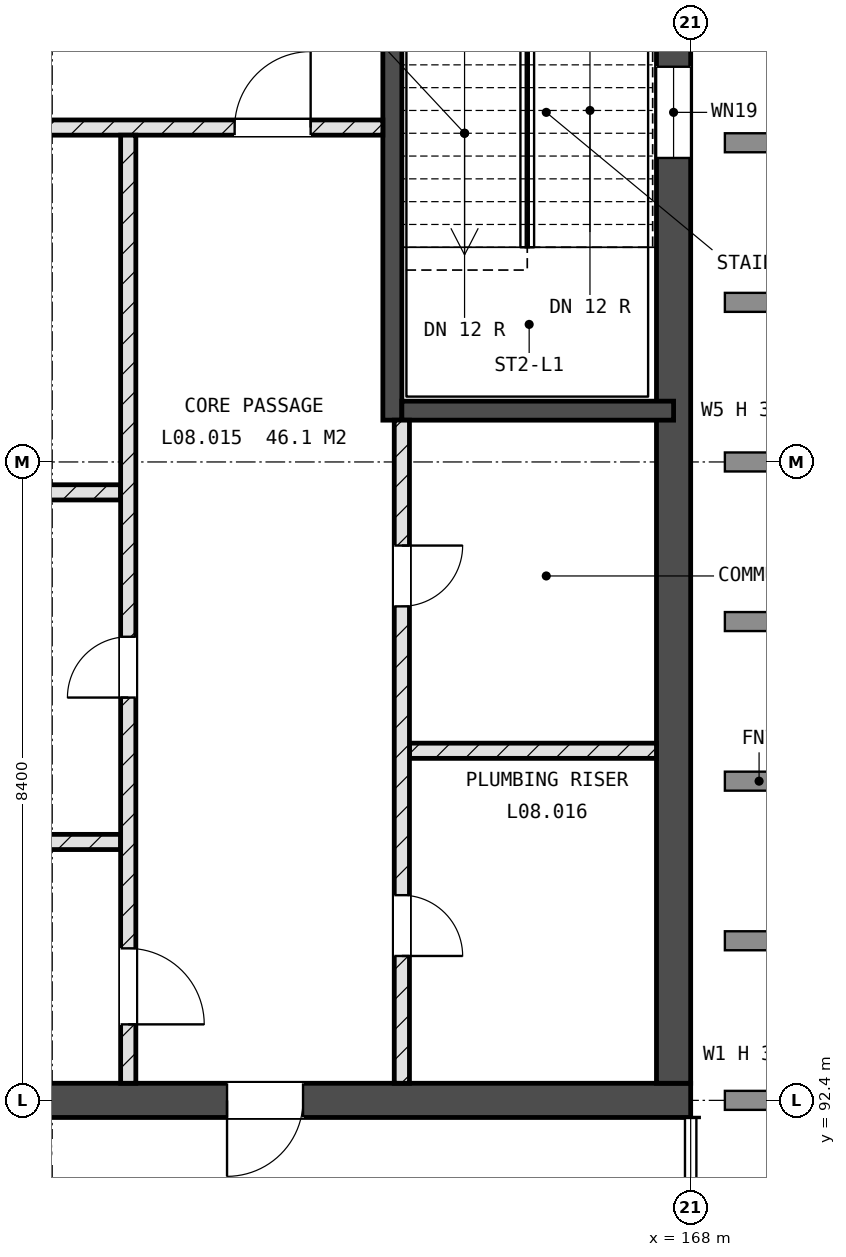
"""IFC4 building model, lengths in metres.
Left out: names, types, materials, properties, quantities, classifications, styles, units other than length and angle.
Written with IfcOpenShell. Run it as: python <this file> out.ifc"""

import sys

from ifc_helpers import new_model, si_unit, direction, frame, frame_2d, origin, place, context, subcontext, project, spatial, rectangle, extrude, element, fill, save


model = new_model("IFC4")
c1 = context("Model", 3, precision=1e-05, world=origin(), true_north=direction((0.0, 1.0)))
c2 = subcontext(c1, "Body", "Model", "MODEL_VIEW")
j1 = project(units=[si_unit("LENGTHUNIT", "METRE"), si_unit("PLANEANGLEUNIT", "RADIAN")], contexts=[c1])
p1 = place(None, origin())
s1 = spatial("IfcSite", under=j1, at=p1, CompositionType="ELEMENT")
p2 = place(p1, origin())
s2 = spatial("IfcBuilding", under=s1, at=p2, CompositionType="ELEMENT")
p3 = place(p2, frame((0.0, 0.0, 32.4)))
s3 = spatial("IfcBuildingStorey", under=s2, at=p3, CompositionType="ELEMENT", Elevation=32.4)
p4 = place(p3, frame((142.8, 92.4, -0.25), z_axis=(0.0, 0.0, 1.0), x_axis=(1.0, 0.0, 0.0)))
e1 = element("IfcWall", 1, at=p4, inside=s3, PredefinedType="SHEAR", context=c2, shape_type="SweptSolid", body=[
    extrude(rectangle(XDim=25.2, YDim=0.45, at=frame_2d((12.6, 0.0))), origin(), (0.0, 0.0, 1.0), 3.6),
])
p5 = place(p4, frame((1.4, 0.0, 0.25)))
e2 = element("IfcOpeningElement", 2, at=p5, cuts=e1, PredefinedType="OPENING", context=c2, shape_type="SweptSolid", body=[
    extrude(rectangle(XDim=1.0, YDim=2.1, at=frame_2d((0.5, 1.05))), frame((0.0, 0.235, 0.0), z_axis=(0.0, -1.0, 0.0), x_axis=(1.0, 0.0, 0.0)), (0.0, 0.0, 1.0), 0.47),
])
p6 = place(p4, frame((19.1, 0.0, 0.25)))
e3 = element("IfcOpeningElement", 3, at=p6, cuts=e1, PredefinedType="OPENING", context=c2, shape_type="SweptSolid", body=[
    extrude(rectangle(XDim=1.0, YDim=2.1, at=frame_2d((0.5, 1.05))), frame((0.0, 0.235, 0.0), z_axis=(0.0, -1.0, 0.0), x_axis=(1.0, 0.0, 0.0)), (0.0, 0.0, 1.0), 0.47),
])
p7 = place(p4, frame((10.4, 0.0, 0.25)))
e4 = element("IfcOpeningElement", 4, at=p7, cuts=e1, PredefinedType="OPENING", context=c2, shape_type="SweptSolid", body=[
    extrude(rectangle(XDim=1.0, YDim=2.1, at=frame_2d((0.5, 1.05))), frame((0.0, 0.235, 0.0), z_axis=(0.0, -1.0, 0.0), x_axis=(1.0, 0.0, 0.0)), (0.0, 0.0, 1.0), 0.47),
])
p8 = place(p3, frame((167.775, 92.625, -0.25), z_axis=(0.0, 0.0, 1.0), x_axis=(0.0, 1.0, 0.0)))
e5 = element("IfcWall", 5, at=p8, inside=s3, PredefinedType="SHEAR", context=c2, shape_type="SweptSolid", body=[
    extrude(rectangle(XDim=16.35, YDim=0.45, at=frame_2d((8.175, 0.0))), origin(), (0.0, 0.0, 1.0), 3.6),
])
p9 = place(p8, frame((12.175, 0.0, 1.85)))
e6 = element("IfcOpeningElement", 6, at=p9, cuts=e5, PredefinedType="OPENING", context=c2, shape_type="SweptSolid", body=[
    extrude(rectangle(XDim=1.2, YDim=0.9, at=frame_2d((0.6, 0.45))), frame((0.0, 0.235, 0.0), z_axis=(0.0, -1.0, 0.0), x_axis=(1.0, 0.0, 0.0)), (0.0, 0.0, 1.0), 0.47),
])
p10 = place(p3, frame((164.075, 101.35, -0.25), z_axis=(0.0, 0.0, 1.0), x_axis=(0.0, 1.0, 0.0)))
e7 = element("IfcWall", 7, at=p10, inside=s3, PredefinedType="SHEAR", context=c2, shape_type="SweptSolid", body=[
    extrude(rectangle(XDim=7.625, YDim=0.25, at=frame_2d((3.812, 0.0))), origin(), (0.0, 0.0, 1.0), 3.6),
])
p11 = place(p10, frame((6.5, 0.0, 0.25)))
e8 = element("IfcOpeningElement", 8, at=p11, cuts=e7, PredefinedType="OPENING", context=c2, shape_type="SweptSolid", body=[
    extrude(rectangle(XDim=1.0, YDim=2.1, at=frame_2d((0.5, 1.05))), frame((0.0, 0.135, 0.0), z_axis=(0.0, -1.0, 0.0), x_axis=(1.0, 0.0, 0.0)), (0.0, 0.0, 1.0), 0.27),
])
p12 = place(p3, frame((164.2, 101.475, -0.25), z_axis=(0.0, 0.0, 1.0), x_axis=(1.0, 0.0, 0.0)))
e9 = element("IfcWall", 9, at=p12, inside=s3, PredefinedType="SHEAR", context=c2, shape_type="SweptSolid", body=[
    extrude(rectangle(XDim=3.575, YDim=0.25, at=frame_2d((1.788, 0.0))), origin(), (0.0, 0.0, 1.0), 3.6),
])
p13 = place(p3, frame((158.25, 95.8, 0.0), z_axis=(0.0, 0.0, 1.0), x_axis=(1.0, 0.0, 0.0)))
e10 = element("IfcWall", 10, at=p13, inside=s3, PredefinedType="SOLIDWALL", context=c2, shape_type="SweptSolid", body=[
    extrude(rectangle(XDim=2.25, YDim=0.2, at=frame_2d((1.125, 0.0))), origin(), (0.0, 0.0, 1.0), 3.3),
])
p14 = place(p3, frame((164.3, 97.0, 0.0), z_axis=(0.0, 0.0, 1.0), x_axis=(1.0, 0.0, 0.0)))
e11 = element("IfcWall", 11, at=p14, inside=s3, PredefinedType="SOLIDWALL", context=c2, shape_type="SweptSolid", body=[
    extrude(rectangle(XDim=3.25, YDim=0.2, at=frame_2d((1.625, 0.0))), origin(), (0.0, 0.0, 1.0), 3.3),
])
p15 = place(p3, frame((146.5, 100.4, 0.0), z_axis=(0.0, 0.0, 1.0), x_axis=(1.0, 0.0, 0.0)))
e12 = element("IfcWall", 12, at=p15, inside=s3, PredefinedType="SOLIDWALL", context=c2, shape_type="SweptSolid", body=[
    extrude(rectangle(XDim=14.0, YDim=0.2, at=frame_2d((7.0, 0.0))), origin(), (0.0, 0.0, 1.0), 3.3),
])
p16 = place(p3, frame((143.25, 105.2, 0.0), z_axis=(0.0, 0.0, 1.0), x_axis=(1.0, 0.0, 0.0)))
e13 = element("IfcWall", 13, at=p16, inside=s3, PredefinedType="SOLIDWALL", context=c2, shape_type="SweptSolid", body=[
    extrude(rectangle(XDim=20.7, YDim=0.2, at=frame_2d((10.35, 0.0))), origin(), (0.0, 0.0, 1.0), 3.3),
])
p17 = place(p16, frame((11.45, 0.0, 0.0)))
e14 = element("IfcOpeningElement", 14, at=p17, cuts=e13, PredefinedType="OPENING", context=c2, shape_type="SweptSolid", body=[
    extrude(rectangle(XDim=0.8, YDim=2.1, at=frame_2d((0.4, 1.05))), frame((0.0, 0.11, 0.0), z_axis=(0.0, -1.0, 0.0), x_axis=(1.0, 0.0, 0.0)), (0.0, 0.0, 1.0), 0.22),
])
p18 = place(p16, frame((18.75, 0.0, 0.0)))
e15 = element("IfcOpeningElement", 15, at=p18, cuts=e13, PredefinedType="OPENING", context=c2, shape_type="SweptSolid", body=[
    extrude(rectangle(XDim=1.0, YDim=2.1, at=frame_2d((0.5, 1.05))), frame((0.0, 0.11, 0.0), z_axis=(0.0, -1.0, 0.0), x_axis=(1.0, 0.0, 0.0)), (0.0, 0.0, 1.0), 0.22),
])
p19 = place(p3, frame((160.6, 92.625, 0.0), z_axis=(0.0, 0.0, 1.0), x_axis=(0.0, 1.0, 0.0)))
e16 = element("IfcWall", 16, at=p19, inside=s3, PredefinedType="SOLIDWALL", context=c2, shape_type="SweptSolid", body=[
    extrude(rectangle(XDim=12.475, YDim=0.2, at=frame_2d((6.238, 0.0))), origin(), (0.0, 0.0, 1.0), 3.3),
])
p20 = place(p19, frame((5.075, 0.0, 0.0)))
e17 = element("IfcOpeningElement", 17, at=p20, cuts=e16, PredefinedType="OPENING", context=c2, shape_type="SweptSolid", body=[
    extrude(rectangle(XDim=0.8, YDim=2.1, at=frame_2d((0.4, 1.05))), frame((0.0, 0.11, 0.0), z_axis=(0.0, -1.0, 0.0), x_axis=(1.0, 0.0, 0.0)), (0.0, 0.0, 1.0), 0.22),
])
p21 = place(p19, frame((0.775, 0.0, 0.0)))
e18 = element("IfcOpeningElement", 18, at=p21, cuts=e16, PredefinedType="OPENING", context=c2, shape_type="SweptSolid", body=[
    extrude(rectangle(XDim=1.0, YDim=2.1, at=frame_2d((0.5, 1.05))), frame((0.0, 0.11, 0.0), z_axis=(0.0, -1.0, 0.0), x_axis=(1.0, 0.0, 0.0)), (0.0, 0.0, 1.0), 0.22),
])
p22 = place(p3, frame((164.2, 92.625, 0.0), z_axis=(0.0, 0.0, 1.0), x_axis=(0.0, 1.0, 0.0)))
e19 = element("IfcWall", 19, at=p22, inside=s3, PredefinedType="SOLIDWALL", context=c2, shape_type="SweptSolid", body=[
    extrude(rectangle(XDim=8.725, YDim=0.2, at=frame_2d((4.363, 0.0))), origin(), (0.0, 0.0, 1.0), 3.3),
])
p23 = place(p22, frame((1.675, 0.0, 0.0)))
e20 = element("IfcOpeningElement", 20, at=p23, cuts=e19, PredefinedType="OPENING", context=c2, shape_type="SweptSolid", body=[
    extrude(rectangle(XDim=0.8, YDim=2.1, at=frame_2d((0.4, 1.05))), frame((0.0, 0.11, 0.0), z_axis=(0.0, -1.0, 0.0), x_axis=(1.0, 0.0, 0.0)), (0.0, 0.0, 1.0), 0.22),
])
p24 = place(p22, frame((6.275, 0.0, 0.0)))
e21 = element("IfcOpeningElement", 21, at=p24, cuts=e19, PredefinedType="OPENING", context=c2, shape_type="SweptSolid", body=[
    extrude(rectangle(XDim=0.8, YDim=2.1, at=frame_2d((0.4, 1.05))), frame((0.0, 0.11, 0.0), z_axis=(0.0, -1.0, 0.0), x_axis=(1.0, 0.0, 0.0)), (0.0, 0.0, 1.0), 0.22),
])
p25 = place(p9, origin())
e22 = element("IfcWindow", 22, at=p25, inside=s3, PartitioningType="SINGLE_PANEL", PredefinedType="WINDOW", context=c2, shape_type="SweptSolid", body=[
    extrude(rectangle(XDim=1.2, YDim=0.9, at=frame_2d((0.6, 0.45))), frame((0.0, 0.03, 0.0), z_axis=(0.0, -1.0, 0.0), x_axis=(1.0, 0.0, 0.0)), (0.0, 0.0, 1.0), 0.06),
])
fill(e6, e22)
p26 = place(p23, origin())
e23 = element("IfcDoor", 23, at=p26, inside=s3, OperationType="SINGLE_SWING_LEFT", PredefinedType="DOOR", context=c2, shape_type="SweptSolid", body=[
    extrude(rectangle(XDim=0.8, YDim=2.1, at=frame_2d((0.4, 1.05))), frame((0.0, 0.025, 0.0), z_axis=(0.0, -1.0, 0.0), x_axis=(1.0, 0.0, 0.0)), (0.0, 0.0, 1.0), 0.05),
])
fill(e20, e23)
p27 = place(p24, origin())
e24 = element("IfcDoor", 24, at=p27, inside=s3, OperationType="SINGLE_SWING_RIGHT", PredefinedType="DOOR", context=c2, shape_type="SweptSolid", body=[
    extrude(rectangle(XDim=0.8, YDim=2.1, at=frame_2d((0.4, 1.05))), frame((0.0, 0.025, 0.0), z_axis=(0.0, -1.0, 0.0), x_axis=(1.0, 0.0, 0.0)), (0.0, 0.0, 1.0), 0.05),
])
fill(e21, e24)
p28 = place(p20, origin())
e25 = element("IfcDoor", 25, at=p28, inside=s3, OperationType="SINGLE_SWING_RIGHT", PredefinedType="DOOR", context=c2, shape_type="SweptSolid", body=[
    extrude(rectangle(XDim=0.8, YDim=2.1, at=frame_2d((0.4, 1.05))), frame((0.0, 0.025, 0.0), z_axis=(0.0, -1.0, 0.0), x_axis=(1.0, 0.0, 0.0)), (0.0, 0.0, 1.0), 0.05),
])
fill(e17, e25)
p29 = place(p6, origin())
e26 = element("IfcDoor", 26, at=p29, inside=s3, OperationType="SINGLE_SWING_LEFT", PredefinedType="DOOR", context=c2, shape_type="SweptSolid", body=[
    extrude(rectangle(XDim=1.0, YDim=2.1, at=frame_2d((0.5, 1.05))), frame((0.0, 0.025, 0.0), z_axis=(0.0, -1.0, 0.0), x_axis=(1.0, 0.0, 0.0)), (0.0, 0.0, 1.0), 0.05),
])
fill(e3, e26)
p30 = place(p21, origin())
e27 = element("IfcDoor", 27, at=p30, inside=s3, OperationType="SINGLE_SWING_LEFT", PredefinedType="DOOR", context=c2, shape_type="SweptSolid", body=[
    extrude(rectangle(XDim=1.0, YDim=2.1, at=frame_2d((0.5, 1.05))), frame((0.0, 0.025, 0.0), z_axis=(0.0, -1.0, 0.0), x_axis=(1.0, 0.0, 0.0)), (0.0, 0.0, 1.0), 0.05),
])
fill(e18, e27)
p31 = place(p18, origin())
e28 = element("IfcDoor", 28, at=p31, inside=s3, OperationType="SINGLE_SWING_LEFT", PredefinedType="DOOR", context=c2, shape_type="SweptSolid", body=[
    extrude(rectangle(XDim=1.0, YDim=2.1, at=frame_2d((0.5, 1.05))), frame((0.0, 0.025, 0.0), z_axis=(0.0, -1.0, 0.0), x_axis=(1.0, 0.0, 0.0)), (0.0, 0.0, 1.0), 0.05),
])
fill(e15, e28)
save(model, sys.argv[1])
